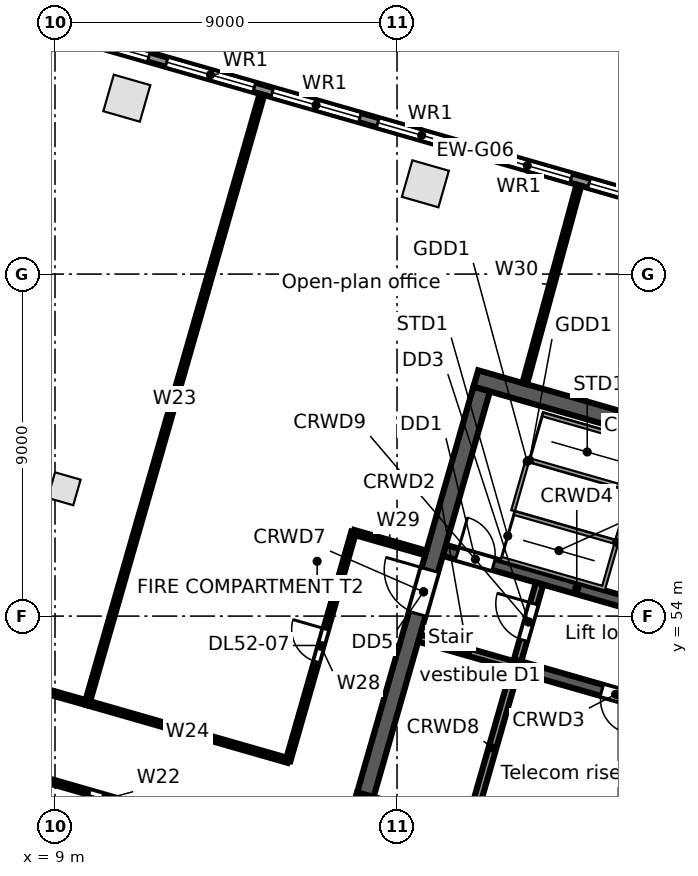
"""IFC4 building model, lengths in metres.
Left out: names, types, materials, properties, quantities, classifications, styles, units other than length and angle.
Written with IfcOpenShell. Run it as: python <this file> out.ifc"""

import sys

from ifc_helpers import new_model, si_unit, direction, frame, frame_2d, origin, origin_2d, place, context, subcontext, project, spatial, rectangle, extrude, element, fill, save


model = new_model("IFC4")
c1 = context("Model", 3, precision=1e-05, world=origin(), true_north=direction((0.0, 1.0)))
c2 = subcontext(c1, "Body", "Model", "MODEL_VIEW")
j1 = project(units=[si_unit("LENGTHUNIT", "METRE"), si_unit("PLANEANGLEUNIT", "RADIAN")], contexts=[c1])
p1 = place(None, origin())
s1 = spatial("IfcSite", under=j1, at=p1, CompositionType="ELEMENT")
p2 = place(p1, origin())
s2 = spatial("IfcBuilding", under=s1, at=p2, CompositionType="ELEMENT")
p3 = place(p2, frame((0.0, 0.0, 238.7)))
s3 = spatial("IfcBuildingStorey", under=s2, at=p3, CompositionType="ELEMENT", Elevation=238.7)
for number, where, z_axis, x_axis in (
    (1, (18.746, 65.376, 0.0), (0.0, 0.0, 1.0), (-0.961, 0.276, 0.0)),
    (2, (10.89, 67.629, 0.0), (0.0, 0.0, 1.0), (-0.961, 0.276, 0.0)),
):
    element("IfcColumn", number, at=place(p3, frame(where, z_axis=z_axis, x_axis=x_axis)), inside=s3, PredefinedType="COLUMN", context=c2, shape_type="SweptSolid", body=[
        extrude(rectangle(XDim=1.0, YDim=1.0, at=origin_2d()), origin(), (0.0, 0.0, 1.0), 3.9),
    ])
p4 = place(p3, frame((9.241, 57.35, 0.0), z_axis=(0.0, 0.0, 1.0), x_axis=(0.961261695938, -0.275637355817, 0.0)))
e3 = element("IfcColumn", 3, at=p4, inside=s3, PredefinedType="COLUMN", context=c2, shape_type="SweptSolid", body=[
    extrude(rectangle(XDim=0.7, YDim=0.7, at=origin_2d()), origin(), (0.0, 0.0, 1.0), 3.9),
])
p5 = place(p3, frame((3.34, 71.042, 0.0), z_axis=(0.0, 0.0, 1.0), x_axis=(0.96126179431, -0.275637012753, 0.0)))
e4 = element("IfcWall", 4, at=p5, inside=s3, PredefinedType="STANDARD", context=c2, shape_type="SweptSolid", body=[
    extrude(rectangle(XDim=34.779, YDim=0.25, at=frame_2d((17.39, 0.0))), origin(), (0.0, 0.0, 1.0), 3.62),
])
p6 = place(p5, frame((32.071, 0.0, 0.8)))
e5 = element("IfcOpeningElement", 5, at=p6, cuts=e4, PredefinedType="OPENING", context=c2, shape_type="SweptSolid", body=[
    extrude(rectangle(XDim=2.4, YDim=2.2, at=frame_2d((1.2, 1.1))), frame((0.0, 0.135, 0.0), z_axis=(0.0, -1.0, 0.0), x_axis=(1.0, 0.0, 0.0)), (0.0, 0.0, 1.0), 0.27),
])
p7 = place(p5, frame((29.18, 0.0, 0.8)))
e6 = element("IfcOpeningElement", 6, at=p7, cuts=e4, PredefinedType="OPENING", context=c2, shape_type="SweptSolid", body=[
    extrude(rectangle(XDim=2.4, YDim=2.2, at=frame_2d((1.2, 1.1))), frame((0.0, 0.135, 0.0), z_axis=(0.0, -1.0, 0.0), x_axis=(1.0, 0.0, 0.0)), (0.0, 0.0, 1.0), 0.27),
])
p8 = place(p5, frame((26.289, 0.0, 0.8)))
e7 = element("IfcOpeningElement", 7, at=p8, cuts=e4, PredefinedType="OPENING", context=c2, shape_type="SweptSolid", body=[
    extrude(rectangle(XDim=2.4, YDim=2.2, at=frame_2d((1.2, 1.1))), frame((0.0, 0.135, 0.0), z_axis=(0.0, -1.0, 0.0), x_axis=(1.0, 0.0, 0.0)), (0.0, 0.0, 1.0), 0.27),
])
p9 = place(p5, frame((23.398, 0.0, 0.8)))
e8 = element("IfcOpeningElement", 8, at=p9, cuts=e4, PredefinedType="OPENING", context=c2, shape_type="SweptSolid", body=[
    extrude(rectangle(XDim=2.4, YDim=2.2, at=frame_2d((1.2, 1.1))), frame((0.0, 0.135, 0.0), z_axis=(0.0, -1.0, 0.0), x_axis=(1.0, 0.0, 0.0)), (0.0, 0.0, 1.0), 0.27),
])
p10 = place(p5, frame((20.508, 0.0, 0.8)))
e9 = element("IfcOpeningElement", 9, at=p10, cuts=e4, PredefinedType="OPENING", context=c2, shape_type="SweptSolid", body=[
    extrude(rectangle(XDim=2.4, YDim=2.2, at=frame_2d((1.2, 1.1))), frame((0.0, 0.135, 0.0), z_axis=(0.0, -1.0, 0.0), x_axis=(1.0, 0.0, 0.0)), (0.0, 0.0, 1.0), 0.27),
])
p11 = place(p5, frame((17.616, 0.0, 0.8)))
e10 = element("IfcOpeningElement", 10, at=p11, cuts=e4, PredefinedType="OPENING", context=c2, shape_type="SweptSolid", body=[
    extrude(rectangle(XDim=2.4, YDim=2.2, at=frame_2d((1.2, 1.1))), frame((0.0, 0.135, 0.0), z_axis=(0.0, -1.0, 0.0), x_axis=(1.0, 0.0, 0.0)), (0.0, 0.0, 1.0), 0.27),
])
p12 = place(p5, frame((14.726, 0.0, 0.8)))
e11 = element("IfcOpeningElement", 11, at=p12, cuts=e4, PredefinedType="OPENING", context=c2, shape_type="SweptSolid", body=[
    extrude(rectangle(XDim=2.4, YDim=2.2, at=frame_2d((1.2, 1.1))), frame((0.0, 0.135, 0.0), z_axis=(0.0, -1.0, 0.0), x_axis=(1.0, 0.0, 0.0)), (0.0, 0.0, 1.0), 0.27),
])
p13 = place(p5, frame((11.834, 0.0, 0.8)))
e12 = element("IfcOpeningElement", 12, at=p13, cuts=e4, PredefinedType="OPENING", context=c2, shape_type="SweptSolid", body=[
    extrude(rectangle(XDim=2.4, YDim=2.2, at=frame_2d((1.2, 1.1))), frame((0.0, 0.135, 0.0), z_axis=(0.0, -1.0, 0.0), x_axis=(1.0, 0.0, 0.0)), (0.0, 0.0, 1.0), 0.27),
])
p14 = place(p5, frame((8.944, 0.0, 0.8)))
e13 = element("IfcOpeningElement", 13, at=p14, cuts=e4, PredefinedType="OPENING", context=c2, shape_type="SweptSolid", body=[
    extrude(rectangle(XDim=2.4, YDim=2.2, at=frame_2d((1.2, 1.1))), frame((0.0, 0.135, 0.0), z_axis=(0.0, -1.0, 0.0), x_axis=(1.0, 0.0, 0.0)), (0.0, 0.0, 1.0), 0.27),
])
p15 = place(p5, frame((6.052, 0.0, 0.8)))
e14 = element("IfcOpeningElement", 14, at=p15, cuts=e4, PredefinedType="OPENING", context=c2, shape_type="SweptSolid", body=[
    extrude(rectangle(XDim=2.4, YDim=2.2, at=frame_2d((1.2, 1.1))), frame((0.0, 0.135, 0.0), z_axis=(0.0, -1.0, 0.0), x_axis=(1.0, 0.0, 0.0)), (0.0, 0.0, 1.0), 0.27),
])
p16 = place(p5, frame((3.162, 0.0, 0.8)))
e15 = element("IfcOpeningElement", 15, at=p16, cuts=e4, PredefinedType="OPENING", context=c2, shape_type="SweptSolid", body=[
    extrude(rectangle(XDim=2.4, YDim=2.2, at=frame_2d((1.2, 1.1))), frame((0.0, 0.135, 0.0), z_axis=(0.0, -1.0, 0.0), x_axis=(1.0, 0.0, 0.0)), (0.0, 0.0, 1.0), 0.27),
])
p17 = place(p5, frame((0.271, 0.0, 0.8)))
e16 = element("IfcOpeningElement", 16, at=p17, cuts=e4, PredefinedType="OPENING", context=c2, shape_type="SweptSolid", body=[
    extrude(rectangle(XDim=2.4, YDim=2.2, at=frame_2d((1.2, 1.1))), frame((0.0, 0.135, 0.0), z_axis=(0.0, -1.0, 0.0), x_axis=(1.0, 0.0, 0.0)), (0.0, 0.0, 1.0), 0.27),
])
p18 = place(p3, frame((16.89, 49.149, 0.0), z_axis=(0.0, 0.0, 1.0), x_axis=(0.96126248289, -0.275634611374, 0.0)))
e17 = element("IfcWall", 17, at=p18, inside=s3, PredefinedType="SOLIDWALL", context=c2, shape_type="SweptSolid", body=[
    extrude(rectangle(XDim=9.0, YDim=0.45, at=frame_2d((4.5, 0.0))), origin(), (0.0, 0.0, 1.0), 3.62),
])
p19 = place(p3, frame((18.583, 53.423, 0.0), z_axis=(0.0, 0.0, 1.0), x_axis=(0.961259287968, -0.275645753268, 0.0)))
e18 = element("IfcWall", 18, at=p19, inside=s3, PredefinedType="SOLIDWALL", context=c2, shape_type="SweptSolid", body=[
    extrude(rectangle(XDim=2.65, YDim=0.2, at=frame_2d((1.325, 0.0))), origin(), (0.0, 0.0, 1.0), 3.62),
])
p20 = place(p3, frame((21.131, 52.692, 0.0), z_axis=(0.0, 0.0, 1.0), x_axis=(0.961261488075, -0.275638080722, 0.0)))
e19 = element("IfcWall", 19, at=p20, inside=s3, PredefinedType="SOLIDWALL", context=c2, shape_type="SweptSolid", body=[
    extrude(rectangle(XDim=5.45, YDim=0.3, at=frame_2d((2.725, 0.0))), origin(), (0.0, 0.0, 1.0), 3.62),
])
p21 = place(p20, frame((2.35, 0.0, 0.0)))
e20 = element("IfcOpeningElement", 20, at=p21, cuts=e19, PredefinedType="OPENING", context=c2, shape_type="SweptSolid", body=[
    extrude(rectangle(XDim=0.9, YDim=2.1, at=frame_2d((0.45, 1.05))), frame((0.0, 0.16, 0.0), z_axis=(0.0, -1.0, 0.0), x_axis=(1.0, 0.0, 0.0)), (0.0, 0.0, 1.0), 0.32),
])
p22 = place(p3, frame((19.245, 55.73, 0.0), z_axis=(0.0, 0.0, 1.0), x_axis=(0.961263007877, -0.275632780503, 0.0)))
e21 = element("IfcWall", 21, at=p22, inside=s3, PredefinedType="SOLIDWALL", context=c2, shape_type="SweptSolid", body=[
    extrude(rectangle(XDim=7.25, YDim=0.3, at=frame_2d((3.625, 0.0))), origin(), (0.0, 0.0, 1.0), 3.62),
])
p23 = place(p22, frame((0.35, 0.0, 0.0)))
e22 = element("IfcOpeningElement", 22, at=p23, cuts=e21, PredefinedType="OPENING", context=c2, shape_type="SweptSolid", body=[
    extrude(rectangle(XDim=1.0, YDim=2.1, at=frame_2d((0.5, 1.05))), frame((0.0, 0.16, 0.0), z_axis=(0.0, -1.0, 0.0), x_axis=(1.0, 0.0, 0.0)), (0.0, 0.0, 1.0), 0.32),
])
p24 = place(p3, frame((20.073, 60.252, 0.0), z_axis=(0.0, 0.0, 1.0), x_axis=(0.96126248289, -0.275634611374, 0.0)))
e23 = element("IfcWall", 23, at=p24, inside=s3, PredefinedType="SOLIDWALL", context=c2, shape_type="SweptSolid", body=[
    extrude(rectangle(XDim=9.0, YDim=0.45, at=frame_2d((4.5, 0.0))), origin(), (0.0, 0.0, 1.0), 3.62),
])
p25 = place(p3, frame((17.168, 49.303, 0.0), z_axis=(0.0, 0.0, 1.0), x_axis=(0.275638974822, 0.961261231695, 0.0)))
e24 = element("IfcWall", 24, at=p25, inside=s3, PredefinedType="SOLIDWALL", context=c2, shape_type="SweptSolid", body=[
    extrude(rectangle(XDim=11.1, YDim=0.45, at=frame_2d((5.55, 0.0))), origin(), (0.0, 0.0, 1.0), 3.62),
])
p26 = place(p25, frame((4.95, 0.0, 0.0)))
e25 = element("IfcOpeningElement", 25, at=p26, cuts=e24, PredefinedType="OPENING", context=c2, shape_type="SweptSolid", body=[
    extrude(rectangle(XDim=1.2, YDim=2.1, at=frame_2d((0.6, 1.05))), frame((0.0, 0.235, 0.0), z_axis=(0.0, -1.0, 0.0), x_axis=(1.0, 0.0, 0.0)), (0.0, 0.0, 1.0), 0.47),
])
p27 = place(p3, frame((19.932, 48.511, 0.0), z_axis=(0.0, 0.0, 1.0), x_axis=(0.275642273411, 0.961260285827, 0.0)))
e26 = element("IfcWall", 26, at=p27, inside=s3, PredefinedType="SOLIDWALL", context=c2, shape_type="SweptSolid", body=[
    extrude(rectangle(XDim=4.2, YDim=0.2, at=frame_2d((2.1, 0.0))), origin(), (0.0, 0.0, 1.0), 3.62),
])
p28 = place(p3, frame((21.172, 52.837, 0.0), z_axis=(0.0, 0.0, 1.0), x_axis=(0.275657676022, 0.961255868981, 0.0)))
e27 = element("IfcWall", 27, at=p28, inside=s3, PredefinedType="PARTITIONING", context=c2, shape_type="SweptSolid", body=[
    extrude(rectangle(XDim=2.1, YDim=0.2, at=frame_2d((1.05, 0.0))), origin(), (0.0, 0.0, 1.0), 3.62),
])
p29 = place(p28, frame((0.55, 0.0, 0.0)))
e28 = element("IfcOpeningElement", 28, at=p29, cuts=e27, PredefinedType="OPENING", context=c2, shape_type="SweptSolid", body=[
    extrude(rectangle(XDim=1.0, YDim=2.1, at=frame_2d((0.5, 1.05))), frame((0.0, 0.11, 0.0), z_axis=(0.0, -1.0, 0.0), x_axis=(1.0, 0.0, 0.0)), (0.0, 0.0, 1.0), 0.22),
])
p30 = place(p3, frame((0.0, 54.5, 0.0), z_axis=(0.0, 0.0, 1.0), x_axis=(0.962263108276, -0.272120764462, 0.0)))
e29 = element("IfcWall", 29, at=p30, inside=s3, PredefinedType="PARTITIONING", context=c2, shape_type="SweptSolid", body=[
    extrude(rectangle(XDim=10.234, YDim=0.125, at=frame_2d((5.117, 0.0))), origin(), (0.0, 0.0, 1.0), 2.9),
])
p31 = place(p30, frame((4.7, 0.0, 0.0)))
e30 = element("IfcOpeningElement", 30, at=p31, cuts=e29, PredefinedType="OPENING", context=c2, shape_type="SweptSolid", body=[
    extrude(rectangle(XDim=0.9, YDim=2.1, at=frame_2d((0.45, 1.05))), frame((0.0, 0.073, 0.0), z_axis=(0.0, -1.0, 0.0), x_axis=(1.0, 0.0, 0.0)), (0.0, 0.0, 1.0), 0.145),
])
p32 = place(p3, frame((6.344, 50.379, 0.0), z_axis=(0.0, 0.0, 1.0), x_axis=(0.961251402136, -0.275673252041, 0.0)))
e31 = element("IfcWall", 31, at=p32, inside=s3, PredefinedType="PARTITIONING", context=c2, shape_type="SweptSolid", body=[
    extrude(rectangle(XDim=8.499, YDim=0.125, at=frame_2d((4.25, 0.0))), origin(), (0.0, 0.0, 1.0), 2.8),
])
p33 = place(p32, frame((3.7, 0.0, 0.0)))
e32 = element("IfcOpeningElement", 32, at=p33, cuts=e31, PredefinedType="OPENING", context=c2, shape_type="SweptSolid", body=[
    extrude(rectangle(XDim=0.9, YDim=2.1, at=frame_2d((0.45, 1.05))), frame((0.0, 0.073, 0.0), z_axis=(0.0, -1.0, 0.0), x_axis=(1.0, 0.0, 0.0)), (0.0, 0.0, 1.0), 0.145),
])
p34 = place(p3, frame((9.848, 51.715, 0.0), z_axis=(0.0, 0.0, 1.0), x_axis=(0.27594414117, 0.961173673669, 0.0)))
e33 = element("IfcWall", 33, at=p34, inside=s3, PredefinedType="PARTITIONING", context=c2, shape_type="SweptSolid", body=[
    extrude(rectangle(XDim=16.66, YDim=0.125, at=frame_2d((8.33, 0.0))), origin(), (0.0, 0.0, 1.0), 2.792),
])
p35 = place(p3, frame((9.848, 51.715, 0.0), z_axis=(0.0, 0.0, 1.0), x_axis=(0.961258850611, -0.275647278458, 0.0)))
e34 = element("IfcWall", 34, at=p35, inside=s3, PredefinedType="PARTITIONING", context=c2, shape_type="SweptSolid", body=[
    extrude(rectangle(XDim=5.5, YDim=0.125, at=frame_2d((2.75, 0.0))), origin(), (0.0, 0.0, 1.0), 2.8),
])
p36 = place(p3, frame((15.135, 50.199, 0.0), z_axis=(0.0, 0.0, 1.0), x_axis=(0.275551788837, 0.961286227753, 0.0)))
e35 = element("IfcWall", 35, at=p36, inside=s3, PredefinedType="PARTITIONING", context=c2, shape_type="SweptSolid", body=[
    extrude(rectangle(XDim=6.249, YDim=0.125, at=frame_2d((3.125, 0.0))), origin(), (0.0, 0.0, 1.0), 2.8),
])
p37 = place(p36, frame((2.7, 0.0, 0.0)))
e36 = element("IfcOpeningElement", 36, at=p37, cuts=e35, PredefinedType="OPENING", context=c2, shape_type="SweptSolid", body=[
    extrude(rectangle(XDim=0.9, YDim=2.1, at=frame_2d((0.45, 1.05))), frame((0.0, 0.073, 0.0), z_axis=(0.0, -1.0, 0.0), x_axis=(1.0, 0.0, 0.0)), (0.0, 0.0, 1.0), 0.145),
])
p38 = place(p3, frame((16.857, 56.206, 0.0), z_axis=(0.0, 0.0, 1.0), x_axis=(0.961383985066, -0.275210525341, 0.0)))
e37 = element("IfcWall", 37, at=p38, inside=s3, PredefinedType="PARTITIONING", context=c2, shape_type="SweptSolid", body=[
    extrude(rectangle(XDim=1.977, YDim=0.125, at=frame_2d((0.988, 0.0))), origin(), (0.0, 0.0, 1.0), 3.62),
])
p39 = place(p3, frame((21.36, 60.117, 0.0), z_axis=(0.0, 0.0, 1.0), x_axis=(0.263151767798, 0.964754449124, 0.0)))
e38 = element("IfcWall", 38, at=p39, inside=s3, PredefinedType="PARTITIONING", context=c2, shape_type="SweptSolid", body=[
    extrude(rectangle(XDim=5.411, YDim=0.125, at=frame_2d((2.705, 0.0))), origin(), (0.0, 0.0, 1.0), 3.0),
])
p40 = place(p10, origin())
e39 = element("IfcWindow", 39, at=p40, inside=s3, PartitioningType="SINGLE_PANEL", PredefinedType="WINDOW", context=c2, shape_type="SweptSolid", body=[
    extrude(rectangle(XDim=2.4, YDim=2.2, at=frame_2d((1.2, 1.1))), frame((0.0, 0.03, 0.0), z_axis=(0.0, -1.0, 0.0), x_axis=(1.0, 0.0, 0.0)), (0.0, 0.0, 1.0), 0.06),
])
fill(e9, e39)
p41 = place(p11, origin())
e40 = element("IfcWindow", 40, at=p41, inside=s3, PartitioningType="SINGLE_PANEL", PredefinedType="WINDOW", context=c2, shape_type="SweptSolid", body=[
    extrude(rectangle(XDim=2.4, YDim=2.2, at=frame_2d((1.2, 1.1))), frame((0.0, 0.03, 0.0), z_axis=(0.0, -1.0, 0.0), x_axis=(1.0, 0.0, 0.0)), (0.0, 0.0, 1.0), 0.06),
])
fill(e10, e40)
p42 = place(p12, origin())
e41 = element("IfcWindow", 41, at=p42, inside=s3, PartitioningType="SINGLE_PANEL", PredefinedType="WINDOW", context=c2, shape_type="SweptSolid", body=[
    extrude(rectangle(XDim=2.4, YDim=2.2, at=frame_2d((1.2, 1.1))), frame((0.0, 0.03, 0.0), z_axis=(0.0, -1.0, 0.0), x_axis=(1.0, 0.0, 0.0)), (0.0, 0.0, 1.0), 0.06),
])
fill(e11, e41)
p43 = place(p13, origin())
e42 = element("IfcWindow", 42, at=p43, inside=s3, PartitioningType="SINGLE_PANEL", PredefinedType="WINDOW", context=c2, shape_type="SweptSolid", body=[
    extrude(rectangle(XDim=2.4, YDim=2.2, at=frame_2d((1.2, 1.1))), frame((0.0, 0.03, 0.0), z_axis=(0.0, -1.0, 0.0), x_axis=(1.0, 0.0, 0.0)), (0.0, 0.0, 1.0), 0.06),
])
fill(e12, e42)
p44 = place(p14, origin())
e43 = element("IfcWindow", 43, at=p44, inside=s3, PartitioningType="SINGLE_PANEL", PredefinedType="WINDOW", context=c2, shape_type="SweptSolid", body=[
    extrude(rectangle(XDim=2.4, YDim=2.2, at=frame_2d((1.2, 1.1))), frame((0.0, 0.03, 0.0), z_axis=(0.0, -1.0, 0.0), x_axis=(1.0, 0.0, 0.0)), (0.0, 0.0, 1.0), 0.06),
])
fill(e13, e43)
p45 = place(p15, origin())
e44 = element("IfcWindow", 44, at=p45, inside=s3, PartitioningType="SINGLE_PANEL", PredefinedType="WINDOW", context=c2, shape_type="SweptSolid", body=[
    extrude(rectangle(XDim=2.4, YDim=2.2, at=frame_2d((1.2, 1.1))), frame((0.0, 0.03, 0.0), z_axis=(0.0, -1.0, 0.0), x_axis=(1.0, 0.0, 0.0)), (0.0, 0.0, 1.0), 0.06),
])
fill(e14, e44)
p46 = place(p23, origin())
e45 = element("IfcDoor", 45, at=p46, inside=s3, OperationType="SINGLE_SWING_LEFT", PredefinedType="DOOR", context=c2, shape_type="SweptSolid", body=[
    extrude(rectangle(XDim=1.0, YDim=2.1, at=frame_2d((0.5, 1.05))), frame((0.0, 0.025, 0.0), z_axis=(0.0, -1.0, 0.0), x_axis=(1.0, 0.0, 0.0)), (0.0, 0.0, 1.0), 0.05),
])
fill(e22, e45)
p47 = place(p29, origin())
e46 = element("IfcDoor", 46, at=p47, inside=s3, OperationType="SINGLE_SWING_RIGHT", PredefinedType="DOOR", context=c2, shape_type="SweptSolid", body=[
    extrude(rectangle(XDim=1.0, YDim=2.1, at=frame_2d((0.5, 1.05))), frame((0.0, 0.025, 0.0), z_axis=(0.0, -1.0, 0.0), x_axis=(1.0, 0.0, 0.0)), (0.0, 0.0, 1.0), 0.05),
])
fill(e28, e46)
p48 = place(p26, origin())
e47 = element("IfcDoor", 47, at=p48, inside=s3, OperationType="SINGLE_SWING_RIGHT", PredefinedType="DOOR", context=c2, shape_type="SweptSolid", body=[
    extrude(rectangle(XDim=1.2, YDim=2.1, at=frame_2d((0.6, 1.05))), frame((0.0, 0.025, 0.0), z_axis=(0.0, -1.0, 0.0), x_axis=(1.0, 0.0, 0.0)), (0.0, 0.0, 1.0), 0.05),
])
fill(e25, e47)
p49 = place(p21, frame((0.9, 0.0, 0.0), z_axis=(0.0, 0.0, 1.0), x_axis=(-1.0, 0.0, 0.0)))
e48 = element("IfcDoor", 48, at=p49, inside=s3, OperationType="SINGLE_SWING_LEFT", PredefinedType="DOOR", context=c2, shape_type="SweptSolid", body=[
    extrude(rectangle(XDim=0.9, YDim=2.1, at=frame_2d((0.45, 1.05))), frame((0.0, 0.025, 0.0), z_axis=(0.0, -1.0, 0.0), x_axis=(1.0, 0.0, 0.0)), (0.0, 0.0, 1.0), 0.05),
])
fill(e20, e48)
p50 = place(p37, origin())
e49 = element("IfcDoor", 49, at=p50, inside=s3, OperationType="SINGLE_SWING_RIGHT", PredefinedType="DOOR", context=c2, shape_type="SweptSolid", body=[
    extrude(rectangle(XDim=0.9, YDim=2.1, at=frame_2d((0.45, 1.05))), frame((0.0, 0.025, 0.0), z_axis=(0.0, -1.0, 0.0), x_axis=(1.0, 0.0, 0.0)), (0.0, 0.0, 1.0), 0.05),
])
fill(e36, e49)
p51 = place(p33, frame((0.9, 0.0, 0.0), z_axis=(0.0, 0.0, 1.0), x_axis=(-1.0, 0.0, 0.0)))
e50 = element("IfcDoor", 50, at=p51, inside=s3, OperationType="SINGLE_SWING_RIGHT", PredefinedType="DOOR", context=c2, shape_type="SweptSolid", body=[
    extrude(rectangle(XDim=0.9, YDim=2.1, at=frame_2d((0.45, 1.05))), frame((0.0, 0.025, 0.0), z_axis=(0.0, -1.0, 0.0), x_axis=(1.0, 0.0, 0.0)), (0.0, 0.0, 1.0), 0.05),
])
fill(e32, e50)
save(model, sys.argv[1])
